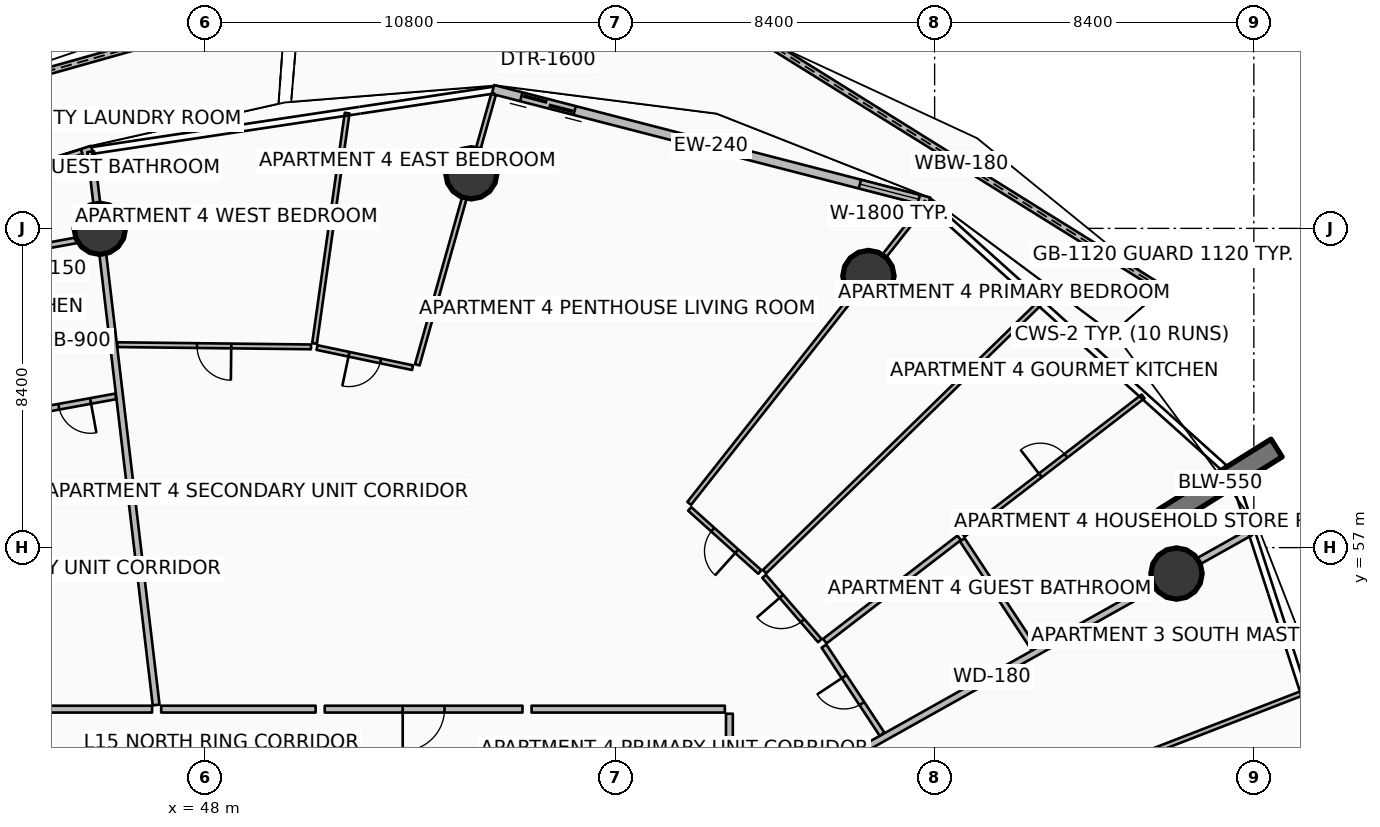
"""IFC4 building model, lengths in metres.
Left out: names, types, materials, properties, quantities, classifications, styles, units other than length and angle.
Written with IfcOpenShell. Run it as: python <this file> out.ifc"""

import sys

from ifc_helpers import new_model, si_unit, direction, frame, frame_2d, origin, origin_2d, place, context, subcontext, project, spatial, polyline, rectangle, circle, outline, extrude, element, fill, save


model = new_model("IFC4")
c1 = context("Model", 3, precision=1e-05, world=origin(), true_north=direction((0.0, 1.0)))
c2 = subcontext(c1, "Body", "Model", "MODEL_VIEW")
j1 = project(units=[si_unit("LENGTHUNIT", "METRE"), si_unit("PLANEANGLEUNIT", "RADIAN")], contexts=[c1])
p1 = place(None, origin())
s1 = spatial("IfcSite", under=j1, at=p1, CompositionType="ELEMENT")
p2 = place(p1, origin())
s2 = spatial("IfcBuilding", under=s1, at=p2, CompositionType="ELEMENT")
p3 = place(p2, frame((0.0, 0.0, 63.9)))
s3 = spatial("IfcBuildingStorey", under=s2, at=p3, CompositionType="ELEMENT", Elevation=63.9)
p4 = place(p3, frame((73.23, 57.765, 0.0), z_axis=(0.0, 0.0, 1.0), x_axis=(0.848053161125, 0.529911158502, 0.0)))
e1 = element("IfcWall", 1, at=p4, inside=s3, PredefinedType="SOLIDWALL", context=c2, shape_type="SweptSolid", body=[
    extrude(rectangle(XDim=3.5, YDim=0.55, at=frame_2d((1.75, 0.0))), origin(), (0.0, 0.0, 1.0), 3.75),
])
for number, where, z_axis, x_axis in (
    (2, (73.565, 56.317, 0.0), (0.0, 0.0, 1.0), (1.0, 0.0, 0.0)),
    (3, (65.458, 64.146, 0.0), (0.0, 0.0, 1.0), (1.0, 0.0, 0.0)),
    (4, (55.008, 66.849, 0.0), (0.0, 0.0, 1.0), (1.0, 0.0, 0.0)),
    (5, (45.232, 65.389, 0.0), (0.0, 0.0, 1.0), (1.0, 0.0, 0.0)),
):
    element("IfcColumn", number, at=place(p3, frame(where, z_axis=z_axis, x_axis=x_axis)), inside=s3, PredefinedType="COLUMN", context=c2, shape_type="SweptSolid", body=[
        extrude(circle(Radius=0.675, at=origin_2d()), origin(), (0.0, 0.0, 1.0), 3.5),
    ])
p5 = place(p3, frame((73.208, 63.797, 0.0), z_axis=(0.0, 0.0, 1.0), x_axis=(-0.848703588119, 0.52886881125, 0.0)))
e6 = element("IfcWall", 6, at=p5, inside=s3, PredefinedType="PARAPET", context=c2, shape_type="SweptSolid", body=[
    extrude(outline(polyline([(0.0, 0.0), (12.491, 0.0), (12.491, 1.632), (6.246, 1.418), (0.0, 1.233), (0.0, 0.0)])), frame((0.0, 0.09, 0.0), z_axis=(0.0, -1.0, 0.0), x_axis=(1.0, 0.0, 0.0)), (0.0, 0.0, 1.0), 0.18),
])
p6 = place(p3, frame((50.126, 71.299, 0.0), z_axis=(0.0, 0.0, 1.0), x_axis=(-0.962607038131, -0.270901624471, 0.0)))
e7 = element("IfcWall", 7, at=p6, inside=s3, PredefinedType="PARAPET", context=c2, shape_type="SweptSolid", body=[
    extrude(outline(polyline([(0.0, 0.0), (10.964, 0.0), (10.964, 1.632), (5.482, 1.798), (0.0, 1.86), (0.0, 0.0)])), frame((0.0, 0.09, 0.0), z_axis=(0.0, -1.0, 0.0), x_axis=(1.0, 0.0, 0.0)), (0.0, 0.0, 1.0), 0.18),
])
p7 = place(p3, frame((67.054, 66.096, 0.0), z_axis=(0.0, 0.0, 1.0), x_axis=(-0.96833871487, 0.249640007378, 0.0)))
e8 = element("IfcWall", 8, at=p7, inside=s3, PredefinedType="SOLIDWALL", context=c2, shape_type="SweptSolid", body=[
    extrude(rectangle(XDim=11.851, YDim=0.24, at=frame_2d((5.926, 0.0))), origin(), (0.0, 0.0, 1.0), 2.45),
])
p8 = place(p7, frame((9.631, 0.0, 0.0)))
e9 = element("IfcOpeningElement", 9, at=p8, cuts=e8, PredefinedType="OPENING", context=c2, shape_type="SweptSolid", body=[
    extrude(rectangle(XDim=1.45, YDim=2.15, at=frame_2d((0.725, 1.075))), frame((0.0, 0.13, 0.0), z_axis=(0.0, -1.0, 0.0), x_axis=(1.0, 0.0, 0.0)), (0.0, 0.0, 1.0), 0.26),
])
p9 = place(p7, frame((0.28, 0.0, 0.65)))
e10 = element("IfcOpeningElement", 10, at=p9, cuts=e8, PredefinedType="OPENING", context=c2, shape_type="SweptSolid", body=[
    extrude(rectangle(XDim=1.6, YDim=1.5, at=frame_2d((0.8, 0.75))), frame((0.0, 0.13, 0.0), z_axis=(0.0, -1.0, 0.0), x_axis=(1.0, 0.0, 0.0)), (0.0, 0.0, 1.0), 0.26),
])
p10 = place(p3, frame((45.036, 67.458, 0.0), z_axis=(0.0, 0.0, 1.0), x_axis=(-0.951054679225, -0.309022648238, 0.0)))
e11 = element("IfcWall", 11, at=p10, inside=s3, PredefinedType="SOLIDWALL", context=c2, shape_type="SweptSolid", body=[
    extrude(rectangle(XDim=10.097, YDim=0.24, at=frame_2d((5.048, 0.0))), origin(), (0.0, 0.0, 1.0), 2.45),
])
p11 = place(p10, frame((7.877, 0.0, 0.0)))
e12 = element("IfcOpeningElement", 12, at=p11, cuts=e11, PredefinedType="OPENING", context=c2, shape_type="SweptSolid", body=[
    extrude(rectangle(XDim=1.45, YDim=2.15, at=frame_2d((0.725, 1.075))), frame((0.0, 0.13, 0.0), z_axis=(0.0, -1.0, 0.0), x_axis=(1.0, 0.0, 0.0)), (0.0, 0.0, 1.0), 0.26),
])
p12 = place(p10, frame((0.28, 0.0, 0.65)))
e13 = element("IfcOpeningElement", 13, at=p12, cuts=e11, PredefinedType="OPENING", context=c2, shape_type="SweptSolid", body=[
    extrude(rectangle(XDim=1.6, YDim=1.5, at=frame_2d((0.8, 0.75))), frame((0.0, 0.13, 0.0), z_axis=(0.0, -1.0, 0.0), x_axis=(1.0, 0.0, 0.0)), (0.0, 0.0, 1.0), 0.26),
])
p13 = place(p3, frame((61.896, 49.782, 0.0), z_axis=(0.0, 0.0, 1.0), x_axis=(0.872493215695, 0.488626225828, 0.0)))
e14 = element("IfcWall", 14, at=p13, inside=s3, PredefinedType="PARTITIONING", context=c2, shape_type="SweptSolid", body=[
    extrude(rectangle(XDim=15.612, YDim=0.18, at=frame_2d((7.806, 0.0))), origin(), (0.0, 0.0, 1.0), 2.867),
])
p14 = place(p3, frame((46.715, 52.859, 0.0), z_axis=(0.0, 0.0, 1.0), x_axis=(-0.117534950089, 0.993068746617, 0.0)))
e15 = element("IfcWall", 15, at=p14, inside=s3, PredefinedType="PARTITIONING", context=c2, shape_type="SweptSolid", body=[
    extrude(rectangle(XDim=14.661, YDim=0.18, at=frame_2d((7.33, 0.0))), origin(), (0.0, 0.0, 1.0), 2.867),
])
p15 = place(p3, frame((46.608, 52.75, 0.0), z_axis=(0.0, 0.0, 1.0), x_axis=(-1.0, 0.0, 0.0)))
e16 = element("IfcWall", 16, at=p15, inside=s3, PredefinedType="PARTITIONING", context=c2, shape_type="SweptSolid", body=[
    extrude(rectangle(XDim=4.508, YDim=0.18, at=frame_2d((2.254, 0.0))), origin(), (0.0, 0.0, 1.0), 2.867),
])
p16 = place(p3, frame((45.653, 60.979, 0.0), z_axis=(0.0, 0.0, 1.0), x_axis=(-0.983791601568, -0.179315600783, 0.0)))
e17 = element("IfcWall", 17, at=p16, inside=s3, PredefinedType="PARTITIONING", context=c2, shape_type="SweptSolid", body=[
    extrude(rectangle(XDim=2.198, YDim=0.15, at=frame_2d((1.099, 0.0))), origin(), (0.0, 0.0, 1.0), 2.867),
])
p17 = place(p16, frame((0.674, 0.0, 0.0)))
e18 = element("IfcOpeningElement", 18, at=p17, cuts=e17, PredefinedType="OPENING", context=c2, shape_type="SweptSolid", body=[
    extrude(rectangle(XDim=0.85, YDim=2.06, at=frame_2d((0.425, 1.03))), frame((0.0, 0.085, 0.0), z_axis=(0.0, -1.0, 0.0), x_axis=(1.0, 0.0, 0.0)), (0.0, 0.0, 1.0), 0.17),
])
p18 = place(p3, frame((45.156, 65.184, 0.0), z_axis=(0.0, 0.0, 1.0), x_axis=(-0.983792433056, -0.179311038873, 0.0)))
e19 = element("IfcWall", 19, at=p18, inside=s3, PredefinedType="PARTITIONING", context=c2, shape_type="SweptSolid", body=[
    extrude(rectangle(XDim=2.726, YDim=0.15, at=frame_2d((1.363, 0.0))), origin(), (0.0, 0.0, 1.0), 2.867),
])
p19 = place(p3, frame((66.115, 49.008, 0.0), z_axis=(0.0, 0.0, 1.0), x_axis=(0.932641955578, 0.360803246514, 0.0)))
e20 = element("IfcWall", 20, at=p19, inside=s3, PredefinedType="PARTITIONING", context=c2, shape_type="SweptSolid", body=[
    extrude(rectangle(XDim=11.556, YDim=0.125, at=frame_2d((5.778, 0.0))), origin(), (0.0, 0.0, 1.0), 2.94),
])
p20 = place(p3, frame((56.354, 52.75, 0.0), z_axis=(0.0, 0.0, 1.0), x_axis=(-1.0, 0.0, 0.0)))
e21 = element("IfcWall", 21, at=p20, inside=s3, PredefinedType="PARTITIONING", context=c2, shape_type="SweptSolid", body=[
    extrude(rectangle(XDim=5.203, YDim=0.18, at=frame_2d((2.601, 0.0))), origin(), (0.0, 0.0, 1.0), 2.867),
])
p21 = place(p20, frame((2.052, 0.0, 0.0)))
e22 = element("IfcOpeningElement", 22, at=p21, cuts=e21, PredefinedType="OPENING", context=c2, shape_type="SweptSolid", body=[
    extrude(rectangle(XDim=1.1, YDim=2.1, at=frame_2d((0.55, 1.05))), frame((0.0, 0.1, 0.0), z_axis=(0.0, -1.0, 0.0), x_axis=(1.0, 0.0, 0.0)), (0.0, 0.0, 1.0), 0.2),
])
p22 = place(p3, frame((61.8, 49.848, 0.0), z_axis=(0.0, 0.0, 1.0), x_axis=(0.0, 1.0, 0.0)))
e23 = element("IfcWall", 23, at=p22, inside=s3, PredefinedType="PARTITIONING", context=c2, shape_type="SweptSolid", body=[
    extrude(rectangle(XDim=2.781, YDim=0.18, at=frame_2d((1.391, 0.0))), origin(), (0.0, 0.0, 1.0), 2.867),
])
p23 = place(p3, frame((61.68, 52.75, 0.0), z_axis=(0.0, 0.0, 1.0), x_axis=(-1.0, 0.0, 0.0)))
e24 = element("IfcWall", 24, at=p23, inside=s3, PredefinedType="PARTITIONING", context=c2, shape_type="SweptSolid", body=[
    extrude(rectangle(XDim=5.085, YDim=0.18, at=frame_2d((2.543, 0.0))), origin(), (0.0, 0.0, 1.0), 2.867),
])
p24 = place(p3, frame((60.743, 58.164, 0.0), z_axis=(0.0, 0.0, 1.0), x_axis=(0.61907620874, 0.785330916093, 0.0)))
e25 = element("IfcWall", 25, at=p24, inside=s3, PredefinedType="PARTITIONING", context=c2, shape_type="SweptSolid", body=[
    extrude(rectangle(XDim=10.091, YDim=0.125, at=frame_2d((5.046, 0.0))), origin(), (0.0, 0.0, 1.0), 2.867),
])
p25 = place(p3, frame((65.816, 52.092, 0.0), z_axis=(0.0, 0.0, 1.0), x_axis=(-0.550532146696, 0.834813964578, 0.0)))
e26 = element("IfcWall", 26, at=p25, inside=s3, PredefinedType="PARTITIONING", context=c2, shape_type="SweptSolid", body=[
    extrude(rectangle(XDim=2.776, YDim=0.15, at=frame_2d((1.388, 0.0))), origin(), (0.0, 0.0, 1.0), 2.867),
])
p26 = place(p25, frame((0.963, 0.0, 0.0)))
e27 = element("IfcOpeningElement", 27, at=p26, cuts=e26, PredefinedType="OPENING", context=c2, shape_type="SweptSolid", body=[
    extrude(rectangle(XDim=0.85, YDim=2.06, at=frame_2d((0.425, 1.03))), frame((0.0, 0.085, 0.0), z_axis=(0.0, -1.0, 0.0), x_axis=(1.0, 0.0, 0.0)), (0.0, 0.0, 1.0), 0.17),
])
p27 = place(p3, frame((69.821, 54.335, 0.0), z_axis=(0.0, 0.0, 1.0), x_axis=(-0.550516877558, 0.834824033868, 0.0)))
e28 = element("IfcWall", 28, at=p27, inside=s3, PredefinedType="PARTITIONING", context=c2, shape_type="SweptSolid", body=[
    extrude(rectangle(XDim=3.44, YDim=0.15, at=frame_2d((1.72, 0.0))), origin(), (0.0, 0.0, 1.0), 2.867),
])
p28 = place(p3, frame((64.31, 54.539, 0.0), z_axis=(0.0, 0.0, 1.0), x_axis=(0.792803030826, 0.609477935871, 0.0)))
e29 = element("IfcWall", 29, at=p28, inside=s3, PredefinedType="PARTITIONING", context=c2, shape_type="SweptSolid", body=[
    extrude(rectangle(XDim=4.46, YDim=0.15, at=frame_2d((2.23, 0.0))), origin(), (0.0, 0.0, 1.0), 2.94),
])
p29 = place(p3, frame((67.949, 57.337, 0.0), z_axis=(0.0, 0.0, 1.0), x_axis=(0.792800135679, 0.609481701832, 0.0)))
e30 = element("IfcWall", 30, at=p29, inside=s3, PredefinedType="PARTITIONING", context=c2, shape_type="SweptSolid", body=[
    extrude(rectangle(XDim=5.976, YDim=0.125, at=frame_2d((2.988, 0.0))), origin(), (0.0, 0.0, 1.0), 2.94),
])
p30 = place(p29, frame((2.563, 0.0, 0.0)))
e31 = element("IfcOpeningElement", 31, at=p30, cuts=e30, PredefinedType="OPENING", context=c2, shape_type="SweptSolid", body=[
    extrude(rectangle(XDim=0.85, YDim=2.06, at=frame_2d((0.425, 1.03))), frame((0.0, 0.073, 0.0), z_axis=(0.0, -1.0, 0.0), x_axis=(1.0, 0.0, 0.0)), (0.0, 0.0, 1.0), 0.145),
])
p31 = place(p3, frame((62.725, 56.368, 0.0), z_axis=(0.0, 0.0, 1.0), x_axis=(0.715749552764, 0.698357056038, 0.0)))
e32 = element("IfcWall", 32, at=p31, inside=s3, PredefinedType="PARTITIONING", context=c2, shape_type="SweptSolid", body=[
    extrude(rectangle(XDim=10.107, YDim=0.125, at=frame_2d((5.053, 0.0))), origin(), (0.0, 0.0, 1.0), 2.94),
])
p32 = place(p3, frame((64.18, 54.552, 0.0), z_axis=(0.0, 0.0, 1.0), x_axis=(-0.654947139149, 0.75567469517, 0.0)))
e33 = element("IfcWall", 33, at=p32, inside=s3, PredefinedType="PARTITIONING", context=c2, shape_type="SweptSolid", body=[
    extrude(rectangle(XDim=2.24, YDim=0.125, at=frame_2d((1.12, 0.0))), origin(), (0.0, 0.0, 1.0), 2.94),
])
p33 = place(p32, frame((0.695, 0.0, 0.0)))
e34 = element("IfcOpeningElement", 34, at=p33, cuts=e33, PredefinedType="OPENING", context=c2, shape_type="SweptSolid", body=[
    extrude(rectangle(XDim=0.85, YDim=2.06, at=frame_2d((0.425, 1.03))), frame((0.0, 0.073, 0.0), z_axis=(0.0, -1.0, 0.0), x_axis=(1.0, 0.0, 0.0)), (0.0, 0.0, 1.0), 0.145),
])
p34 = place(p3, frame((62.601, 56.358, 0.0), z_axis=(0.0, 0.0, 1.0), x_axis=(-0.743435913228, 0.66880717918, 0.0)))
e35 = element("IfcWall", 35, at=p34, inside=s3, PredefinedType="PARTITIONING", context=c2, shape_type="SweptSolid", body=[
    extrude(rectangle(XDim=2.483, YDim=0.125, at=frame_2d((1.241, 0.0))), origin(), (0.0, 0.0, 1.0), 2.867),
])
p35 = place(p34, frame((0.816, 0.0, 0.0)))
e36 = element("IfcOpeningElement", 36, at=p35, cuts=e35, PredefinedType="OPENING", context=c2, shape_type="SweptSolid", body=[
    extrude(rectangle(XDim=0.85, YDim=2.06, at=frame_2d((0.425, 1.03))), frame((0.0, 0.073, 0.0), z_axis=(0.0, -1.0, 0.0), x_axis=(1.0, 0.0, 0.0)), (0.0, 0.0, 1.0), 0.145),
])
p36 = place(p3, frame((50.912, 52.75, 0.0), z_axis=(0.0, 0.0, 1.0), x_axis=(-1.0, 0.0, 0.0)))
e37 = element("IfcWall", 37, at=p36, inside=s3, PredefinedType="PARTITIONING", context=c2, shape_type="SweptSolid", body=[
    extrude(rectangle(XDim=4.064, YDim=0.18, at=frame_2d((2.032, 0.0))), origin(), (0.0, 0.0, 1.0), 2.867),
])
p37 = place(p3, frame((53.587, 61.81, 0.0), z_axis=(0.0, 0.0, 1.0), x_axis=(0.271464088879, 0.962448569249, 0.0)))
e38 = element("IfcWall", 38, at=p37, inside=s3, PredefinedType="PARTITIONING", context=c2, shape_type="SweptSolid", body=[
    extrude(rectangle(XDim=7.389, YDim=0.125, at=frame_2d((3.695, 0.0))), origin(), (0.0, 0.0, 1.0), 2.867),
])
p38 = place(p3, frame((50.883, 62.37, 0.0), z_axis=(0.0, 0.0, 1.0), x_axis=(0.140126411414, 0.990133621702, 0.0)))
e39 = element("IfcWall", 39, at=p38, inside=s3, PredefinedType="PARTITIONING", context=c2, shape_type="SweptSolid", body=[
    extrude(rectangle(XDim=6.124, YDim=0.125, at=frame_2d((3.062, 0.0))), origin(), (0.0, 0.0, 1.0), 2.94),
])
p39 = place(p3, frame((53.462, 61.735, 0.0), z_axis=(0.0, 0.0, 1.0), x_axis=(-0.978499333356, 0.206249980902, 0.0)))
e40 = element("IfcWall", 40, at=p39, inside=s3, PredefinedType="PARTITIONING", context=c2, shape_type="SweptSolid", body=[
    extrude(rectangle(XDim=2.569, YDim=0.125, at=frame_2d((1.284, 0.0))), origin(), (0.0, 0.0, 1.0), 2.867),
])
p40 = place(p39, frame((0.859, 0.0, 0.0)))
e41 = element("IfcOpeningElement", 41, at=p40, cuts=e40, PredefinedType="OPENING", context=c2, shape_type="SweptSolid", body=[
    extrude(rectangle(XDim=0.85, YDim=2.06, at=frame_2d((0.425, 1.03))), frame((0.0, 0.073, 0.0), z_axis=(0.0, -1.0, 0.0), x_axis=(1.0, 0.0, 0.0)), (0.0, 0.0, 1.0), 0.145),
])
p41 = place(p3, frame((50.79, 62.282, 0.0), z_axis=(0.0, 0.0, 1.0), x_axis=(-0.99993505002, 0.011397181261, 0.0)))
e42 = element("IfcWall", 42, at=p41, inside=s3, PredefinedType="PARTITIONING", context=c2, shape_type="SweptSolid", body=[
    extrude(rectangle(XDim=5.098, YDim=0.125, at=frame_2d((2.549, 0.0))), origin(), (0.0, 0.0, 1.0), 2.867),
])
p42 = place(p41, frame((2.099, 0.0, 0.0)))
e43 = element("IfcOpeningElement", 43, at=p42, cuts=e42, PredefinedType="OPENING", context=c2, shape_type="SweptSolid", body=[
    extrude(rectangle(XDim=0.9, YDim=2.08, at=frame_2d((0.45, 1.04))), frame((0.0, 0.073, 0.0), z_axis=(0.0, -1.0, 0.0), x_axis=(1.0, 0.0, 0.0)), (0.0, 0.0, 1.0), 0.145),
])
p43 = place(p8, origin())
e44 = element("IfcDoor", 44, at=p43, inside=s3, OperationType="DOUBLE_DOOR_SLIDING", PredefinedType="DOOR", context=c2, shape_type="SweptSolid", body=[
    extrude(rectangle(XDim=1.45, YDim=2.15, at=frame_2d((0.725, 1.075))), frame((0.0, 0.025, 0.0), z_axis=(0.0, -1.0, 0.0), x_axis=(1.0, 0.0, 0.0)), (0.0, 0.0, 1.0), 0.05),
])
fill(e9, e44)
p44 = place(p9, origin())
e45 = element("IfcWindow", 45, at=p44, inside=s3, PartitioningType="SINGLE_PANEL", PredefinedType="WINDOW", context=c2, shape_type="SweptSolid", body=[
    extrude(rectangle(XDim=1.6, YDim=1.5, at=frame_2d((0.8, 0.75))), frame((0.0, 0.03, 0.0), z_axis=(0.0, -1.0, 0.0), x_axis=(1.0, 0.0, 0.0)), (0.0, 0.0, 1.0), 0.06),
])
fill(e10, e45)
p45 = place(p12, origin())
e46 = element("IfcWindow", 46, at=p45, inside=s3, PartitioningType="SINGLE_PANEL", PredefinedType="WINDOW", context=c2, shape_type="SweptSolid", body=[
    extrude(rectangle(XDim=1.6, YDim=1.5, at=frame_2d((0.8, 0.75))), frame((0.0, 0.03, 0.0), z_axis=(0.0, -1.0, 0.0), x_axis=(1.0, 0.0, 0.0)), (0.0, 0.0, 1.0), 0.06),
])
fill(e13, e46)
p46 = place(p17, origin())
e47 = element("IfcDoor", 47, at=p46, inside=s3, OperationType="SINGLE_SWING_LEFT", PredefinedType="DOOR", context=c2, shape_type="SweptSolid", body=[
    extrude(rectangle(XDim=0.85, YDim=2.06, at=frame_2d((0.425, 1.03))), frame((0.0, 0.025, 0.0), z_axis=(0.0, -1.0, 0.0), x_axis=(1.0, 0.0, 0.0)), (0.0, 0.0, 1.0), 0.05),
])
fill(e18, e47)
p47 = place(p21, origin())
e48 = element("IfcDoor", 48, at=p47, inside=s3, OperationType="SINGLE_SWING_RIGHT", PredefinedType="DOOR", context=c2, shape_type="SweptSolid", body=[
    extrude(rectangle(XDim=1.1, YDim=2.1, at=frame_2d((0.55, 1.05))), frame((0.0, 0.025, 0.0), z_axis=(0.0, -1.0, 0.0), x_axis=(1.0, 0.0, 0.0)), (0.0, 0.0, 1.0), 0.05),
])
fill(e22, e48)
p48 = place(p26, origin())
e49 = element("IfcDoor", 49, at=p48, inside=s3, OperationType="SINGLE_SWING_RIGHT", PredefinedType="DOOR", context=c2, shape_type="SweptSolid", body=[
    extrude(rectangle(XDim=0.85, YDim=2.06, at=frame_2d((0.425, 1.03))), frame((0.0, 0.025, 0.0), z_axis=(0.0, -1.0, 0.0), x_axis=(1.0, 0.0, 0.0)), (0.0, 0.0, 1.0), 0.05),
])
fill(e27, e49)
p49 = place(p30, origin())
e50 = element("IfcDoor", 50, at=p49, inside=s3, OperationType="SINGLE_SWING_LEFT", PredefinedType="DOOR", context=c2, shape_type="SweptSolid", body=[
    extrude(rectangle(XDim=0.85, YDim=2.06, at=frame_2d((0.425, 1.03))), frame((0.0, 0.025, 0.0), z_axis=(0.0, -1.0, 0.0), x_axis=(1.0, 0.0, 0.0)), (0.0, 0.0, 1.0), 0.05),
])
fill(e31, e50)
p50 = place(p33, origin())
e51 = element("IfcDoor", 51, at=p50, inside=s3, OperationType="SINGLE_SWING_RIGHT", PredefinedType="DOOR", context=c2, shape_type="SweptSolid", body=[
    extrude(rectangle(XDim=0.85, YDim=2.06, at=frame_2d((0.425, 1.03))), frame((0.0, 0.025, 0.0), z_axis=(0.0, -1.0, 0.0), x_axis=(1.0, 0.0, 0.0)), (0.0, 0.0, 1.0), 0.05),
])
fill(e34, e51)
p51 = place(p35, origin())
e52 = element("IfcDoor", 52, at=p51, inside=s3, OperationType="SINGLE_SWING_LEFT", PredefinedType="DOOR", context=c2, shape_type="SweptSolid", body=[
    extrude(rectangle(XDim=0.85, YDim=2.06, at=frame_2d((0.425, 1.03))), frame((0.0, 0.025, 0.0), z_axis=(0.0, -1.0, 0.0), x_axis=(1.0, 0.0, 0.0)), (0.0, 0.0, 1.0), 0.05),
])
fill(e36, e52)
p52 = place(p40, origin())
e53 = element("IfcDoor", 53, at=p52, inside=s3, OperationType="SINGLE_SWING_RIGHT", PredefinedType="DOOR", context=c2, shape_type="SweptSolid", body=[
    extrude(rectangle(XDim=0.85, YDim=2.06, at=frame_2d((0.425, 1.03))), frame((0.0, 0.025, 0.0), z_axis=(0.0, -1.0, 0.0), x_axis=(1.0, 0.0, 0.0)), (0.0, 0.0, 1.0), 0.05),
])
fill(e41, e53)
p53 = place(p42, origin())
e54 = element("IfcDoor", 54, at=p53, inside=s3, OperationType="SINGLE_SWING_LEFT", PredefinedType="DOOR", context=c2, shape_type="SweptSolid", body=[
    extrude(rectangle(XDim=0.9, YDim=2.08, at=frame_2d((0.45, 1.04))), frame((0.0, 0.025, 0.0), z_axis=(0.0, -1.0, 0.0), x_axis=(1.0, 0.0, 0.0)), (0.0, 0.0, 1.0), 0.05),
])
fill(e43, e54)
save(model, sys.argv[1])
